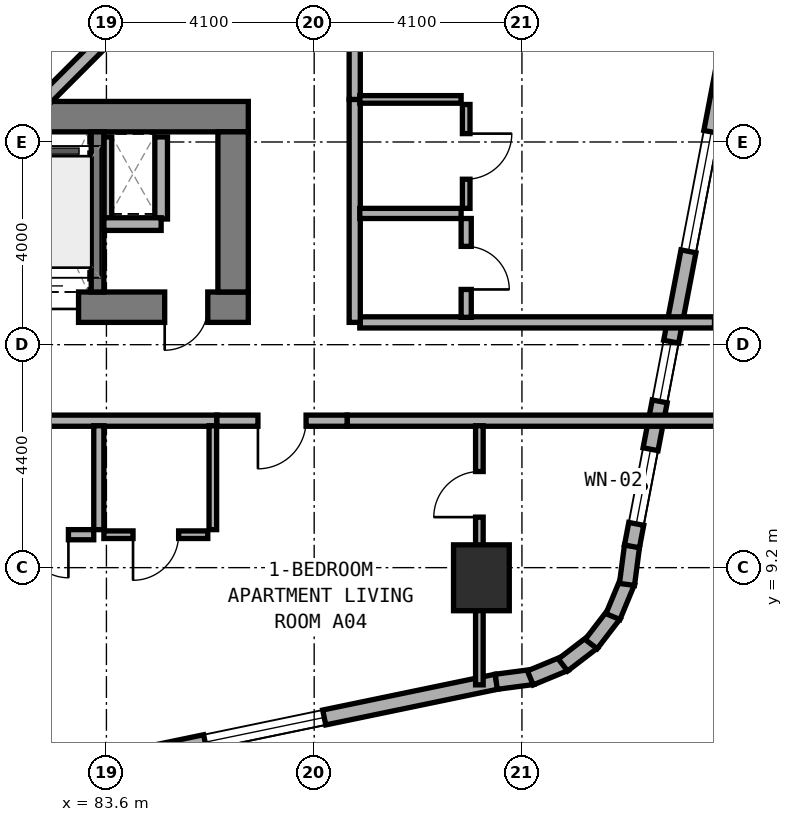
"""IFC4 building model, lengths in metres.
Left out: names, types, materials, properties, quantities, classifications, styles, units other than length and angle.
Written with IfcOpenShell. Run it as: python <this file> out.ifc"""

import sys

from ifc_helpers import new_model, si_unit, direction, frame, frame_2d, origin, origin_2d, place, context, subcontext, project, spatial, rectangle, extrude, element, fill, save


model = new_model("IFC4")
c1 = context("Model", 3, precision=1e-05, world=origin(), true_north=direction((0.0, 1.0)))
c2 = subcontext(c1, "Body", "Model", "MODEL_VIEW")
j1 = project(units=[si_unit("LENGTHUNIT", "METRE"), si_unit("PLANEANGLEUNIT", "RADIAN")], contexts=[c1])
p1 = place(None, origin())
s1 = spatial("IfcSite", under=j1, at=p1, CompositionType="ELEMENT")
p2 = place(p1, origin())
s2 = spatial("IfcBuilding", under=s1, at=p2, CompositionType="ELEMENT")
p3 = place(p2, frame((0.0, 0.0, 45.0)))
s3 = spatial("IfcBuildingStorey", under=s2, at=p3, CompositionType="ELEMENT", Elevation=45.0)
p4 = place(p3, frame((67.8, 14.34, 0.0), z_axis=(0.0, 0.0, 1.0), x_axis=(1.0, 0.0, 0.0)))
e1 = element("IfcWall", 1, at=p4, inside=s3, PredefinedType="SHEAR", context=c2, shape_type="SweptSolid", body=[
    extrude(rectangle(XDim=18.6, YDim=0.6, at=frame_2d((9.3, 0.0))), origin(), (0.0, 0.0, 1.0), 3.5),
])
p5 = place(p4, frame((9.35, 0.0, 0.0)))
e2 = element("IfcOpeningElement", 2, at=p5, cuts=e1, PredefinedType="OPENING", context=c2, shape_type="SweptSolid", body=[
    extrude(rectangle(XDim=1.2, YDim=2.15, at=frame_2d((0.6, 1.075))), frame((0.0, 0.31, 0.0), z_axis=(0.0, -1.0, 0.0), x_axis=(1.0, 0.0, 0.0)), (0.0, 0.0, 1.0), 0.62),
])
p6 = place(p4, frame((16.95, 0.0, 0.0)))
e3 = element("IfcOpeningElement", 3, at=p6, cuts=e1, PredefinedType="OPENING", context=c2, shape_type="SweptSolid", body=[
    extrude(rectangle(XDim=0.85, YDim=2.1, at=frame_2d((0.425, 1.05))), frame((0.0, 0.31, 0.0), z_axis=(0.0, -1.0, 0.0), x_axis=(1.0, 0.0, 0.0)), (0.0, 0.0, 1.0), 0.62),
])
p7 = place(p4, frame((12.55, 0.0, 0.0)))
e4 = element("IfcOpeningElement", 4, at=p7, cuts=e1, PredefinedType="OPENING", context=c2, shape_type="SweptSolid", body=[
    extrude(rectangle(XDim=1.1, YDim=2.15, at=frame_2d((0.55, 1.075))), frame((0.0, 0.31, 0.0), z_axis=(0.0, -1.0, 0.0), x_axis=(1.0, 0.0, 0.0)), (0.0, 0.0, 1.0), 0.62),
])
p8 = place(p4, frame((14.15, 0.0, 0.0)))
e5 = element("IfcOpeningElement", 5, at=p8, cuts=e1, PredefinedType="OPENING", context=c2, shape_type="SweptSolid", body=[
    extrude(rectangle(XDim=1.1, YDim=2.15, at=frame_2d((0.55, 1.075))), frame((0.0, 0.31, 0.0), z_axis=(0.0, -1.0, 0.0), x_axis=(1.0, 0.0, 0.0)), (0.0, 0.0, 1.0), 0.62),
])
p9 = place(p3, frame((67.8, 18.1, 0.0), z_axis=(0.0, 0.0, 1.0), x_axis=(1.0, 0.0, 0.0)))
e6 = element("IfcWall", 6, at=p9, inside=s3, PredefinedType="SHEAR", context=c2, shape_type="SweptSolid", body=[
    extrude(rectangle(XDim=18.6, YDim=0.6, at=frame_2d((9.3, 0.0))), origin(), (0.0, 0.0, 1.0), 3.5),
])
p10 = place(p3, frame((86.1, 14.64, 0.0), z_axis=(0.0, 0.0, 1.0), x_axis=(0.0, 1.0, 0.0)))
e7 = element("IfcWall", 7, at=p10, inside=s3, PredefinedType="SHEAR", context=c2, shape_type="SweptSolid", body=[
    extrude(rectangle(XDim=3.16, YDim=0.6, at=frame_2d((1.58, 0.0))), origin(), (0.0, 0.0, 1.0), 3.5),
])
p11 = place(p3, frame((83.425, 14.64, 0.0), z_axis=(0.0, 0.0, 1.0), x_axis=(0.0, 1.0, 0.0)))
e8 = element("IfcWall", 8, at=p11, inside=s3, PredefinedType="STANDARD", context=c2, shape_type="SweptSolid", body=[
    extrude(rectangle(XDim=3.16, YDim=0.25, at=frame_2d((1.58, 0.0))), origin(), (0.0, 0.0, 1.0), 3.25),
])
p12 = place(p3, frame((91.0, 9.0, 0.0), z_axis=(0.0, 0.0, 1.0), x_axis=(1.0, 0.0, 0.0)))
e9 = element("IfcColumn", 9, at=p12, inside=s3, PredefinedType="COLUMN", context=c2, shape_type="SweptSolid", body=[
    extrude(rectangle(XDim=1.1, YDim=1.3, at=origin_2d()), origin(), (0.0, 0.0, 1.0), 3.5),
])
p13 = place(p3, frame((82.564, 5.136, 0.0), z_axis=(0.0, 0.0, 1.0), x_axis=(0.979128391325, 0.203242695569, 0.0)))
e10 = element("IfcWall", 10, at=p13, inside=s3, PredefinedType="STANDARD", context=c2, shape_type="SweptSolid", body=[
    extrude(rectangle(XDim=8.92, YDim=0.3, at=frame_2d((4.46, 0.0))), origin(), (0.0, 0.0, 1.0), 3.25),
])
p14 = place(p13, frame((3.048, 0.0, 0.8)))
e11 = element("IfcOpeningElement", 11, at=p14, cuts=e10, PredefinedType="OPENING", context=c2, shape_type="SweptSolid", body=[
    extrude(rectangle(XDim=2.4, YDim=1.6, at=frame_2d((1.2, 0.8))), frame((0.0, 0.16, 0.0), z_axis=(0.0, -1.0, 0.0), x_axis=(1.0, 0.0, 0.0)), (0.0, 0.0, 1.0), 0.32),
])
p15 = place(p3, frame((91.293, 6.948, 0.0), z_axis=(0.0, 0.0, 1.0), x_axis=(0.991486167159, 0.13021205909, 0.0)))
e12 = element("IfcWall", 12, at=p15, inside=s3, PredefinedType="STANDARD", context=c2, shape_type="SweptSolid", body=[
    extrude(rectangle(XDim=0.729, YDim=0.3, at=frame_2d((0.365, 0.0))), origin(), (0.0, 0.0, 1.0), 3.25),
])
for number, where, z_axis, x_axis in (
    (13, (91.965, 7.024, 0.0), (0.0, 0.0, 1.0), (0.924, 0.384, 0.0)),
    (14, (92.609, 7.279, 0.0), (0.0, 0.0, 1.0), (0.794, 0.608, 0.0)),
    (15, (93.166, 7.691, 0.0), (0.0, 0.0, 1.0), (0.609, 0.793, 0.0)),
):
    element("IfcWall", number, at=place(p3, frame(where, z_axis=z_axis, x_axis=x_axis)), inside=s3, PredefinedType="STANDARD", context=c2, shape_type="SweptSolid", body=[
        extrude(rectangle(XDim=0.746, YDim=0.3, at=frame_2d((0.373, 0.0))), origin(), (0.0, 0.0, 1.0), 3.25),
    ])
p16 = place(p3, frame((93.596, 8.234, 0.0), z_axis=(0.0, 0.0, 1.0), x_axis=(0.383430326427, 0.923569805037, 0.0)))
e16 = element("IfcWall", 16, at=p16, inside=s3, PredefinedType="STANDARD", context=c2, shape_type="SweptSolid", body=[
    extrude(rectangle(XDim=0.746, YDim=0.3, at=frame_2d((0.373, 0.0))), origin(), (0.0, 0.0, 1.0), 3.25),
])
p17 = place(p3, frame((93.873, 8.869, 0.0), z_axis=(0.0, 0.0, 1.0), x_axis=(0.129339184068, 0.991600411186, 0.0)))
e17 = element("IfcWall", 17, at=p17, inside=s3, PredefinedType="STANDARD", context=c2, shape_type="SweptSolid", body=[
    extrude(rectangle(XDim=0.764, YDim=0.3, at=frame_2d((0.382, 0.0))), origin(), (0.0, 0.0, 1.0), 3.25),
])
p18 = place(p3, frame((93.971, 9.62, 0.0), z_axis=(0.0, 0.0, 1.0), x_axis=(0.188087874316, 0.982152203854, 0.0)))
e18 = element("IfcWall", 18, at=p18, inside=s3, PredefinedType="STANDARD", context=c2, shape_type="SweptSolid", body=[
    extrude(rectangle(XDim=9.634, YDim=0.3, at=frame_2d((4.817, 0.0))), origin(), (0.0, 0.0, 1.0), 3.25),
])
p19 = place(p18, frame((0.452, 0.0, 0.85)))
e19 = element("IfcOpeningElement", 19, at=p19, cuts=e18, PredefinedType="OPENING", context=c2, shape_type="SweptSolid", body=[
    extrude(rectangle(XDim=1.5, YDim=1.5, at=frame_2d((0.75, 0.75))), frame((0.0, 0.16, 0.0), z_axis=(0.0, -1.0, 0.0), x_axis=(1.0, 0.0, 0.0)), (0.0, 0.0, 1.0), 0.32),
])
p20 = place(p18, frame((2.913, 0.0, 0.85)))
e20 = element("IfcOpeningElement", 20, at=p20, cuts=e18, PredefinedType="OPENING", context=c2, shape_type="SweptSolid", body=[
    extrude(rectangle(XDim=1.2, YDim=1.5, at=frame_2d((0.6, 0.75))), frame((0.0, 0.16, 0.0), z_axis=(0.0, -1.0, 0.0), x_axis=(1.0, 0.0, 0.0)), (0.0, 0.0, 1.0), 0.32),
])
p21 = place(p18, frame((5.928, 0.0, 0.8)))
e21 = element("IfcOpeningElement", 21, at=p21, cuts=e18, PredefinedType="OPENING", context=c2, shape_type="SweptSolid", body=[
    extrude(rectangle(XDim=2.4, YDim=1.6, at=frame_2d((1.2, 0.8))), frame((0.0, 0.16, 0.0), z_axis=(0.0, -1.0, 0.0), x_axis=(1.0, 0.0, 0.0)), (0.0, 0.0, 1.0), 0.32),
])
p22 = place(p3, frame((82.082, 18.138, 0.0), z_axis=(0.0, 0.0, 1.0), x_axis=(0.707106781187, 0.707106781187, 0.0)))
e22 = element("IfcWall", 22, at=p22, inside=s3, PredefinedType="STANDARD", context=c2, shape_type="SweptSolid", body=[
    extrude(rectangle(XDim=2.311, YDim=0.26, at=frame_2d((1.155, 0.0))), origin(), (0.0, 0.0, 1.0), 3.25),
])
p23 = place(p3, frame((83.63, 16.08, 0.0), z_axis=(0.0, 0.0, 1.0), x_axis=(0.0, 1.0, 0.0)))
e23 = element("IfcWall", 23, at=p23, inside=s3, PredefinedType="PARTITIONING", context=c2, shape_type="SweptSolid", body=[
    extrude(rectangle(XDim=1.62, YDim=0.15, at=frame_2d((0.81, 0.0))), origin(), (0.0, 0.0, 1.0), 2.725),
])
p24 = place(p3, frame((84.68, 16.08, 0.0), z_axis=(0.0, 0.0, 1.0), x_axis=(0.0, 1.0, 0.0)))
e24 = element("IfcWall", 24, at=p24, inside=s3, PredefinedType="SOLIDWALL", context=c2, shape_type="SweptSolid", body=[
    extrude(rectangle(XDim=1.62, YDim=0.25, at=frame_2d((0.81, 0.0))), origin(), (0.0, 0.0, 1.0), 3.22),
])
p25 = place(p3, frame((83.55, 15.98, 0.0), z_axis=(0.0, 0.0, 1.0), x_axis=(1.0, 0.0, 0.0)))
e25 = element("IfcWall", 25, at=p25, inside=s3, PredefinedType="SOLIDWALL", context=c2, shape_type="SweptSolid", body=[
    extrude(rectangle(XDim=1.13, YDim=0.25, at=frame_2d((0.565, 0.0))), origin(), (0.0, 0.0, 1.0), 3.22),
])
p26 = place(p3, frame((81.4, 12.1, 0.0), z_axis=(0.0, 0.0, 1.0), x_axis=(1.0, 0.0, 0.0)))
e26 = element("IfcWall", 26, at=p26, inside=s3, PredefinedType="SOLIDWALL", context=c2, shape_type="SweptSolid", body=[
    extrude(rectangle(XDim=4.38, YDim=0.22, at=frame_2d((2.19, 0.0))), origin(), (0.0, 0.0, 1.0), 2.725),
])
p27 = place(p3, frame((88.35, 12.1, 0.0), z_axis=(0.0, 0.0, 1.0), x_axis=(1.0, 0.0, 0.0)))
e27 = element("IfcWall", 27, at=p27, inside=s3, PredefinedType="SOLIDWALL", context=c2, shape_type="SweptSolid", body=[
    extrude(rectangle(XDim=7.41, YDim=0.22, at=frame_2d((3.705, 0.0))), origin(), (0.0, 0.0, 1.0), 2.865),
])
p28 = place(p3, frame((85.78, 12.1, 0.0), z_axis=(0.0, 0.0, 1.0), x_axis=(1.0, 0.0, 0.0)))
e28 = element("IfcWall", 28, at=p28, inside=s3, PredefinedType="SOLIDWALL", context=c2, shape_type="SweptSolid", body=[
    extrude(rectangle(XDim=2.57, YDim=0.22, at=frame_2d((1.285, 0.0))), origin(), (0.0, 0.0, 1.0), 3.22),
])
p29 = place(p28, frame((0.81, 0.0, 0.0)))
e29 = element("IfcOpeningElement", 29, at=p29, cuts=e28, PredefinedType="OPENING", context=c2, shape_type="SweptSolid", body=[
    extrude(rectangle(XDim=0.95, YDim=2.1, at=frame_2d((0.475, 1.05))), frame((0.0, 0.12, 0.0), z_axis=(0.0, -1.0, 0.0), x_axis=(1.0, 0.0, 0.0)), (0.0, 0.0, 1.0), 0.24),
])
p30 = place(p3, frame((90.96, 6.887, 0.0), z_axis=(0.0, 0.0, 1.0), x_axis=(0.0, 1.0, 0.0)))
e30 = element("IfcWall", 30, at=p30, inside=s3, PredefinedType="PARTITIONING", context=c2, shape_type="SweptSolid", body=[
    extrude(rectangle(XDim=5.113, YDim=0.15, at=frame_2d((2.557, 0.0))), origin(), (0.0, 0.0, 1.0), 2.865),
])
p31 = place(p30, frame((3.31, 0.0, 0.0)))
e31 = element("IfcOpeningElement", 31, at=p31, cuts=e30, PredefinedType="OPENING", context=c2, shape_type="SweptSolid", body=[
    extrude(rectangle(XDim=0.9, YDim=2.1, at=frame_2d((0.45, 1.05))), frame((0.0, 0.085, 0.0), z_axis=(0.0, -1.0, 0.0), x_axis=(1.0, 0.0, 0.0)), (0.0, 0.0, 1.0), 0.17),
])
p32 = place(p3, frame((83.45, 9.95, 0.0), z_axis=(0.0, 0.0, 1.0), x_axis=(0.0, 1.0, 0.0)))
e32 = element("IfcWall", 32, at=p32, inside=s3, PredefinedType="PLUMBINGWALL", context=c2, shape_type="SweptSolid", body=[
    extrude(rectangle(XDim=2.05, YDim=0.2, at=frame_2d((1.025, 0.0))), origin(), (0.0, 0.0, 1.0), 3.22),
])
p33 = place(p3, frame((85.7, 9.95, 0.0), z_axis=(0.0, 0.0, 1.0), x_axis=(0.0, 1.0, 0.0)))
e33 = element("IfcWall", 33, at=p33, inside=s3, PredefinedType="PARTITIONING", context=c2, shape_type="SweptSolid", body=[
    extrude(rectangle(XDim=2.05, YDim=0.15, at=frame_2d((1.025, 0.0))), origin(), (0.0, 0.0, 1.0), 3.22),
])
p34 = place(p3, frame((81.5, 9.85, 0.0), z_axis=(0.0, 0.0, 1.0), x_axis=(1.0, 0.0, 0.0)))
e34 = element("IfcWall", 34, at=p34, inside=s3, PredefinedType="PLUMBINGWALL", context=c2, shape_type="SweptSolid", body=[
    extrude(rectangle(XDim=1.85, YDim=0.2, at=frame_2d((0.925, 0.0))), origin(), (0.0, 0.0, 1.0), 2.725),
])
p35 = place(p34, frame((0.5, 0.0, 0.0)))
e35 = element("IfcOpeningElement", 35, at=p35, cuts=e34, PredefinedType="OPENING", context=c2, shape_type="SweptSolid", body=[
    extrude(rectangle(XDim=0.85, YDim=2.1, at=frame_2d((0.425, 1.05))), frame((0.0, 0.11, 0.0), z_axis=(0.0, -1.0, 0.0), x_axis=(1.0, 0.0, 0.0)), (0.0, 0.0, 1.0), 0.22),
])
p36 = place(p3, frame((83.55, 9.85, 0.0), z_axis=(0.0, 0.0, 1.0), x_axis=(1.0, 0.0, 0.0)))
e36 = element("IfcWall", 36, at=p36, inside=s3, PredefinedType="PARTITIONING", context=c2, shape_type="SweptSolid", body=[
    extrude(rectangle(XDim=2.05, YDim=0.15, at=frame_2d((1.025, 0.0))), origin(), (0.0, 0.0, 1.0), 3.22),
])
p37 = place(p36, frame((0.575, 0.0, 0.0)))
e37 = element("IfcOpeningElement", 37, at=p37, cuts=e36, PredefinedType="OPENING", context=c2, shape_type="SweptSolid", body=[
    extrude(rectangle(XDim=0.9, YDim=2.1, at=frame_2d((0.45, 1.05))), frame((0.0, 0.085, 0.0), z_axis=(0.0, -1.0, 0.0), x_axis=(1.0, 0.0, 0.0)), (0.0, 0.0, 1.0), 0.17),
])
p38 = place(p3, frame((88.6, 14.04, 0.0), z_axis=(0.0, 0.0, 1.0), x_axis=(1.0, 0.0, 0.0)))
e38 = element("IfcWall", 38, at=p38, inside=s3, PredefinedType="SOLIDWALL", context=c2, shape_type="SweptSolid", body=[
    extrude(rectangle(XDim=7.0, YDim=0.22, at=frame_2d((3.5, 0.0))), origin(), (0.0, 0.0, 1.0), 2.865),
])
p39 = place(p3, frame((88.5, 14.04, 0.0), z_axis=(0.0, 0.0, 1.0), x_axis=(0.0, 1.0, 0.0)))
e39 = element("IfcWall", 39, at=p39, inside=s3, PredefinedType="SOLIDWALL", context=c2, shape_type="SweptSolid", body=[
    extrude(rectangle(XDim=4.4, YDim=0.22, at=frame_2d((2.2, 0.0))), origin(), (0.0, 0.0, 1.0), 3.22),
])
p40 = place(p3, frame((88.5, 18.44, 0.0), z_axis=(0.0, 0.0, 1.0), x_axis=(0.0, 1.0, 0.0)))
e40 = element("IfcWall", 40, at=p40, inside=s3, PredefinedType="SOLIDWALL", context=c2, shape_type="SweptSolid", body=[
    extrude(rectangle(XDim=9.56, YDim=0.22, at=frame_2d((4.78, 0.0))), origin(), (0.0, 0.0, 1.0), 2.725),
])
p41 = place(p40, frame((2.405, 0.0, 0.0)))
e41 = element("IfcOpeningElement", 41, at=p41, cuts=e40, PredefinedType="OPENING", context=c2, shape_type="SweptSolid", body=[
    extrude(rectangle(XDim=0.95, YDim=2.1, at=frame_2d((0.475, 1.05))), frame((0.0, 0.12, 0.0), z_axis=(0.0, -1.0, 0.0), x_axis=(1.0, 0.0, 0.0)), (0.0, 0.0, 1.0), 0.24),
])
p42 = place(p3, frame((88.6, 16.19, 0.0), z_axis=(0.0, 0.0, 1.0), x_axis=(1.0, 0.0, 0.0)))
e42 = element("IfcWall", 42, at=p42, inside=s3, PredefinedType="PLUMBINGWALL", context=c2, shape_type="SweptSolid", body=[
    extrude(rectangle(XDim=2.0, YDim=0.2, at=frame_2d((1.0, 0.0))), origin(), (0.0, 0.0, 1.0), 3.22),
])
p43 = place(p3, frame((88.6, 18.44, 0.0), z_axis=(0.0, 0.0, 1.0), x_axis=(1.0, 0.0, 0.0)))
e43 = element("IfcWall", 43, at=p43, inside=s3, PredefinedType="PARTITIONING", context=c2, shape_type="SweptSolid", body=[
    extrude(rectangle(XDim=2.0, YDim=0.15, at=frame_2d((1.0, 0.0))), origin(), (0.0, 0.0, 1.0), 3.22),
])
p44 = place(p3, frame((90.7, 14.14, 0.0), z_axis=(0.0, 0.0, 1.0), x_axis=(0.0, 1.0, 0.0)))
e44 = element("IfcWall", 44, at=p44, inside=s3, PredefinedType="PLUMBINGWALL", context=c2, shape_type="SweptSolid", body=[
    extrude(rectangle(XDim=1.95, YDim=0.2, at=frame_2d((0.975, 0.0))), origin(), (0.0, 0.0, 1.0), 3.22),
])
p45 = place(p44, frame((0.55, 0.0, 0.0)))
e45 = element("IfcOpeningElement", 45, at=p45, cuts=e44, PredefinedType="OPENING", context=c2, shape_type="SweptSolid", body=[
    extrude(rectangle(XDim=0.85, YDim=2.1, at=frame_2d((0.425, 1.05))), frame((0.0, 0.11, 0.0), z_axis=(0.0, -1.0, 0.0), x_axis=(1.0, 0.0, 0.0)), (0.0, 0.0, 1.0), 0.22),
])
p46 = place(p3, frame((90.7, 16.29, 0.0), z_axis=(0.0, 0.0, 1.0), x_axis=(0.0, 1.0, 0.0)))
e46 = element("IfcWall", 46, at=p46, inside=s3, PredefinedType="PARTITIONING", context=c2, shape_type="SweptSolid", body=[
    extrude(rectangle(XDim=2.05, YDim=0.15, at=frame_2d((1.025, 0.0))), origin(), (0.0, 0.0, 1.0), 3.22),
])
p47 = place(p46, frame((0.575, 0.0, 0.0)))
e47 = element("IfcOpeningElement", 47, at=p47, cuts=e46, PredefinedType="OPENING", context=c2, shape_type="SweptSolid", body=[
    extrude(rectangle(XDim=0.9, YDim=2.1, at=frame_2d((0.45, 1.05))), frame((0.0, 0.085, 0.0), z_axis=(0.0, -1.0, 0.0), x_axis=(1.0, 0.0, 0.0)), (0.0, 0.0, 1.0), 0.17),
])
p48 = place(p14, origin())
e48 = element("IfcWindow", 48, at=p48, inside=s3, PartitioningType="SINGLE_PANEL", PredefinedType="WINDOW", context=c2, shape_type="SweptSolid", body=[
    extrude(rectangle(XDim=2.4, YDim=1.6, at=frame_2d((1.2, 0.8))), frame((0.0, 0.03, 0.0), z_axis=(0.0, -1.0, 0.0), x_axis=(1.0, 0.0, 0.0)), (0.0, 0.0, 1.0), 0.06),
])
fill(e11, e48)
p49 = place(p19, origin())
e49 = element("IfcWindow", 49, at=p49, inside=s3, PartitioningType="SINGLE_PANEL", PredefinedType="WINDOW", context=c2, shape_type="SweptSolid", body=[
    extrude(rectangle(XDim=1.5, YDim=1.5, at=frame_2d((0.75, 0.75))), frame((0.0, 0.03, 0.0), z_axis=(0.0, -1.0, 0.0), x_axis=(1.0, 0.0, 0.0)), (0.0, 0.0, 1.0), 0.06),
])
fill(e19, e49)
p50 = place(p20, origin())
e50 = element("IfcWindow", 50, at=p50, inside=s3, PartitioningType="SINGLE_PANEL", PredefinedType="WINDOW", context=c2, shape_type="SweptSolid", body=[
    extrude(rectangle(XDim=1.2, YDim=1.5, at=frame_2d((0.6, 0.75))), frame((0.0, 0.03, 0.0), z_axis=(0.0, -1.0, 0.0), x_axis=(1.0, 0.0, 0.0)), (0.0, 0.0, 1.0), 0.06),
])
fill(e20, e50)
p51 = place(p21, origin())
e51 = element("IfcWindow", 51, at=p51, inside=s3, PartitioningType="SINGLE_PANEL", PredefinedType="WINDOW", context=c2, shape_type="SweptSolid", body=[
    extrude(rectangle(XDim=2.4, YDim=1.6, at=frame_2d((1.2, 0.8))), frame((0.0, 0.03, 0.0), z_axis=(0.0, -1.0, 0.0), x_axis=(1.0, 0.0, 0.0)), (0.0, 0.0, 1.0), 0.06),
])
fill(e21, e51)
p52 = place(p6, frame((0.85, 0.0, 0.0), z_axis=(0.0, 0.0, 1.0), x_axis=(-1.0, 0.0, 0.0)))
e52 = element("IfcDoor", 52, at=p52, inside=s3, OperationType="SINGLE_SWING_RIGHT", PredefinedType="DOOR", context=c2, shape_type="SweptSolid", body=[
    extrude(rectangle(XDim=0.85, YDim=2.1, at=frame_2d((0.425, 1.05))), frame((0.0, 0.025, 0.0), z_axis=(0.0, -1.0, 0.0), x_axis=(1.0, 0.0, 0.0)), (0.0, 0.0, 1.0), 0.05),
])
fill(e3, e52)
p53 = place(p8, frame((1.1, 0.0, 0.0), z_axis=(0.0, 0.0, 1.0), x_axis=(-1.0, 0.0, 0.0)))
e53 = element("IfcDoor", 53, at=p53, inside=s3, OperationType="DOUBLE_DOOR_SLIDING", PredefinedType="DOOR", context=c2, shape_type="SweptSolid", body=[
    extrude(rectangle(XDim=1.1, YDim=2.15, at=frame_2d((0.55, 1.075))), frame((0.0, 0.025, 0.0), z_axis=(0.0, -1.0, 0.0), x_axis=(1.0, 0.0, 0.0)), (0.0, 0.0, 1.0), 0.05),
])
fill(e5, e53)
p54 = place(p29, frame((0.95, 0.0, 0.0), z_axis=(0.0, 0.0, 1.0), x_axis=(-1.0, 0.0, 0.0)))
e54 = element("IfcDoor", 54, at=p54, inside=s3, OperationType="SINGLE_SWING_RIGHT", PredefinedType="DOOR", context=c2, shape_type="SweptSolid", body=[
    extrude(rectangle(XDim=0.95, YDim=2.1, at=frame_2d((0.475, 1.05))), frame((0.0, 0.025, 0.0), z_axis=(0.0, -1.0, 0.0), x_axis=(1.0, 0.0, 0.0)), (0.0, 0.0, 1.0), 0.05),
])
fill(e29, e54)
p55 = place(p31, origin())
e55 = element("IfcDoor", 55, at=p55, inside=s3, OperationType="SINGLE_SWING_LEFT", PredefinedType="DOOR", context=c2, shape_type="SweptSolid", body=[
    extrude(rectangle(XDim=0.9, YDim=2.1, at=frame_2d((0.45, 1.05))), frame((0.0, 0.025, 0.0), z_axis=(0.0, -1.0, 0.0), x_axis=(1.0, 0.0, 0.0)), (0.0, 0.0, 1.0), 0.05),
])
fill(e31, e55)
p56 = place(p35, frame((0.85, 0.0, 0.0), z_axis=(0.0, 0.0, 1.0), x_axis=(-1.0, 0.0, 0.0)))
e56 = element("IfcDoor", 56, at=p56, inside=s3, OperationType="SINGLE_SWING_LEFT", PredefinedType="DOOR", context=c2, shape_type="SweptSolid", body=[
    extrude(rectangle(XDim=0.85, YDim=2.1, at=frame_2d((0.425, 1.05))), frame((0.0, 0.025, 0.0), z_axis=(0.0, -1.0, 0.0), x_axis=(1.0, 0.0, 0.0)), (0.0, 0.0, 1.0), 0.05),
])
fill(e35, e56)
p57 = place(p37, frame((0.9, 0.0, 0.0), z_axis=(0.0, 0.0, 1.0), x_axis=(-1.0, 0.0, 0.0)))
e57 = element("IfcDoor", 57, at=p57, inside=s3, OperationType="SINGLE_SWING_RIGHT", PredefinedType="DOOR", context=c2, shape_type="SweptSolid", body=[
    extrude(rectangle(XDim=0.9, YDim=2.1, at=frame_2d((0.45, 1.05))), frame((0.0, 0.025, 0.0), z_axis=(0.0, -1.0, 0.0), x_axis=(1.0, 0.0, 0.0)), (0.0, 0.0, 1.0), 0.05),
])
fill(e37, e57)
p58 = place(p45, frame((0.85, 0.0, 0.0), z_axis=(0.0, 0.0, 1.0), x_axis=(-1.0, 0.0, 0.0)))
e58 = element("IfcDoor", 58, at=p58, inside=s3, OperationType="SINGLE_SWING_RIGHT", PredefinedType="DOOR", context=c2, shape_type="SweptSolid", body=[
    extrude(rectangle(XDim=0.85, YDim=2.1, at=frame_2d((0.425, 1.05))), frame((0.0, 0.025, 0.0), z_axis=(0.0, -1.0, 0.0), x_axis=(1.0, 0.0, 0.0)), (0.0, 0.0, 1.0), 0.05),
])
fill(e45, e58)
p59 = place(p47, frame((0.9, 0.0, 0.0), z_axis=(0.0, 0.0, 1.0), x_axis=(-1.0, 0.0, 0.0)))
e59 = element("IfcDoor", 59, at=p59, inside=s3, OperationType="SINGLE_SWING_LEFT", PredefinedType="DOOR", context=c2, shape_type="SweptSolid", body=[
    extrude(rectangle(XDim=0.9, YDim=2.1, at=frame_2d((0.45, 1.05))), frame((0.0, 0.025, 0.0), z_axis=(0.0, -1.0, 0.0), x_axis=(1.0, 0.0, 0.0)), (0.0, 0.0, 1.0), 0.05),
])
fill(e47, e59)
save(model, sys.argv[1])
